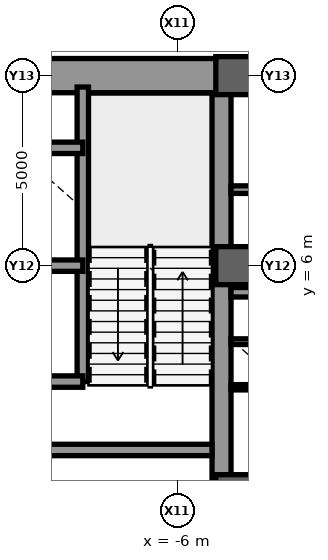
"""IFC4 building model, lengths in metres.
Left out: names, types, materials, properties, quantities, classifications, styles, units other than length and angle.
Written with IfcOpenShell. Run it as: python <this file> out.ifc"""

import sys

from ifc_helpers import new_model, si_unit, direction, frame, frame_2d, origin, origin_2d, place, context, subcontext, project, spatial, rectangle, extrude, source, transform, mapped, element, save


model = new_model("IFC4")
c1 = context("Model", 3, precision=1e-05, world=origin(), true_north=direction((0.0, 1.0)))
c2 = subcontext(c1, "Body", "Model", "MODEL_VIEW")
j1 = project(units=[si_unit("LENGTHUNIT", "METRE"), si_unit("PLANEANGLEUNIT", "RADIAN")], contexts=[c1])
p1 = place(None, origin())
s1 = spatial("IfcSite", under=j1, at=p1, CompositionType="ELEMENT")
p2 = place(p1, origin())
s2 = spatial("IfcBuilding", under=s1, at=p2, CompositionType="ELEMENT")
p3 = place(p2, frame((0.0, 0.0, -9.6)))
s3 = spatial("IfcBuildingStorey", under=s2, at=p3, CompositionType="ELEMENT", Elevation=-9.6)
m1 = source(origin(), c2, "Body", "SweptSolid", [
    extrude(rectangle(XDim=21.4, YDim=0.5, at=frame_2d((10.7, 0.0))), origin(), (0.0, 0.0, 1.0), 4.48),
])
p4 = place(p3, frame((-4.85, -10.7, 0.0), z_axis=(0.0, 0.0, 1.0), x_axis=(0.0, 1.0, 0.0)))
e1 = element("IfcWall", 1, at=p4, inside=s3, PredefinedType="SHEAR", context=c2, shape_type="MappedRepresentation", body=[
    mapped(m1, transform((0.0, 0.0, 0.0), scale=1.0)),
])
m2 = source(origin(), c2, "Body", "SweptSolid", [
    extrude(rectangle(XDim=5.85, YDim=0.9, at=frame_2d((2.925, 0.0))), origin(), (0.0, 0.0, 1.0), 4.48),
])
p5 = place(p3, frame((-10.7, 11.0, 0.0), z_axis=(0.0, 0.0, 1.0), x_axis=(1.0, 0.0, 0.0)))
e2 = element("IfcWall", 2, at=p5, inside=s3, PredefinedType="SHEAR", context=c2, shape_type="MappedRepresentation", body=[
    mapped(m2, transform((0.0, 0.0, 0.0), scale=1.0)),
])
m3 = source(origin(), c2, "Body", "SweptSolid", [
    extrude(rectangle(XDim=5.6, YDim=0.3, at=frame_2d((2.8, 0.0))), origin(), (0.0, 0.0, 1.0), 4.48),
])
p6 = place(p3, frame((-10.7, 1.15, 0.0), z_axis=(0.0, 0.0, 1.0), x_axis=(1.0, 0.0, 0.0)))
e3 = element("IfcWall", 3, at=p6, inside=s3, PredefinedType="SHEAR", context=c2, shape_type="MappedRepresentation", body=[
    mapped(m3, transform((0.0, 0.0, 0.0), scale=1.0)),
])
m4 = source(origin(), c2, "Body", "SweptSolid", [
    extrude(rectangle(XDim=9.2, YDim=0.5, at=frame_2d((4.6, 0.0))), origin(), (0.0, 0.0, 1.0), 4.48),
])
p7 = place(p3, frame((-4.6, 11.0, 0.0), z_axis=(0.0, 0.0, 1.0), x_axis=(1.0, 0.0, 0.0)))
e4 = element("IfcWall", 4, at=p7, inside=s3, PredefinedType="SHEAR", context=c2, shape_type="MappedRepresentation", body=[
    mapped(m4, transform((0.0, 0.0, 0.0), scale=1.0)),
])
m5 = source(origin(), c2, "Body", "SweptSolid", [
    extrude(rectangle(XDim=1.8, YDim=2.25, at=frame_2d((0.9, 1.125))), frame((0.0, 0.26, 0.0), z_axis=(0.0, -1.0, 0.0), x_axis=(1.0, 0.0, 0.0)), (0.0, 0.0, 1.0), 0.52),
])
p8 = place(p7, frame((3.7, 0.0, 0.0)))
e5 = element("IfcOpeningElement", 5, at=p8, cuts=e4, PredefinedType="OPENING", context=c2, shape_type="MappedRepresentation", body=[
    mapped(m5, transform((0.0, 0.0, 0.0), scale=1.0)),
])
m6 = source(origin(), c2, "Body", "SweptSolid", [
    extrude(rectangle(XDim=1.0, YDim=1.0, at=origin_2d()), origin(), (0.0, 0.0, 1.0), 4.8),
])
for number, where, z_axis, x_axis in (
    (6, (-4.5, 0.0, 0.0), (0.0, 0.0, 1.0), (1.0, 0.0, 0.0)),
    (7, (-4.5, 6.0, 0.0), (0.0, 0.0, 1.0), (1.0, 0.0, 0.0)),
    (8, (-4.5, 11.0, 0.0), (0.0, 0.0, 1.0), (1.0, 0.0, 0.0)),
):
    element("IfcColumn", number, at=place(p3, frame(where, z_axis=z_axis, x_axis=x_axis)), inside=s3, PredefinedType="COLUMN", context=c2, shape_type="MappedRepresentation", body=[
        mapped(m6, transform((0.0, 0.0, 0.0), scale=1.0)),
    ])
m7 = source(origin(), c2, "Body", "SweptSolid", [
    extrude(rectangle(XDim=7.75, YDim=0.3, at=frame_2d((3.875, 0.0))), origin(), (0.0, 0.0, 1.0), 4.48),
])
p9 = place(p3, frame((-8.5, 2.95, 0.0), z_axis=(0.0, 0.0, 1.0), x_axis=(0.0, 1.0, 0.0)))
e9 = element("IfcWall", 9, at=p9, inside=s3, PredefinedType="SHEAR", context=c2, shape_type="MappedRepresentation", body=[
    mapped(m7, transform((0.0, 0.0, 0.0), scale=1.0)),
])
m8 = source(origin(), c2, "Body", "SweptSolid", [
    extrude(rectangle(XDim=2.2, YDim=0.3, at=frame_2d((1.1, 0.0))), origin(), (0.0, 0.0, 1.0), 4.48),
])
for number, where, z_axis, x_axis in (
    (10, (-10.7, 2.95, 0.0), (0.0, 0.0, 1.0), (1.0, 0.0, 0.0)),
    (11, (-10.7, 6.0, 0.0), (0.0, 0.0, 1.0), (1.0, 0.0, 0.0)),
    (12, (-10.7, 9.1, 0.0), (0.0, 0.0, 1.0), (1.0, 0.0, 0.0)),
):
    element("IfcWall", number, at=place(p3, frame(where, z_axis=z_axis, x_axis=x_axis)), inside=s3, PredefinedType="SHEAR", context=c2, shape_type="MappedRepresentation", body=[
        mapped(m8, transform((0.0, 0.0, 0.0), scale=1.0)),
    ])
m9 = source(origin(), c2, "Body", "SweptSolid", [
    extrude(rectangle(XDim=3.45, YDim=0.15, at=frame_2d((1.725, 0.0))), origin(), (0.0, 0.0, 1.0), 4.48),
])
p10 = place(p3, frame((-4.6, 4.0, 0.0), z_axis=(0.0, 0.0, 1.0), x_axis=(1.0, 0.0, 0.0)))
e13 = element("IfcWall", 13, at=p10, inside=s3, PredefinedType="PARTITIONING", context=c2, shape_type="MappedRepresentation", body=[
    mapped(m9, transform((0.0, 0.0, 0.0), scale=1.0)),
])
m10 = source(origin(), c2, "Body", "SweptSolid", [
    extrude(rectangle(XDim=2.45, YDim=0.2, at=frame_2d((1.225, 0.0))), origin(), (0.0, 0.0, 1.0), 4.48),
])
p11 = place(p3, frame((-4.6, 8.0, 0.0), z_axis=(0.0, 0.0, 1.0), x_axis=(1.0, 0.0, 0.0)))
e14 = element("IfcWall", 14, at=p11, inside=s3, PredefinedType="SHEAR", context=c2, shape_type="MappedRepresentation", body=[
    mapped(m10, transform((0.0, 0.0, 0.0), scale=1.0)),
])
m11 = source(origin(), c2, "Body", "SweptSolid", [
    extrude(rectangle(XDim=9.2, YDim=0.25, at=frame_2d((4.6, 0.0))), origin(), (0.0, 0.0, 1.0), 4.48),
])
p12 = place(p3, frame((-4.6, 5.3, 0.0), z_axis=(0.0, 0.0, 1.0), x_axis=(1.0, 0.0, 0.0)))
e15 = element("IfcWall", 15, at=p12, inside=s3, PredefinedType="SHEAR", context=c2, shape_type="MappedRepresentation", body=[
    mapped(m11, transform((0.0, 0.0, 0.0), scale=1.0)),
])
m12 = source(origin(), c2, "Body", "SweptSolid", [
    extrude(rectangle(XDim=1.05, YDim=2.2, at=frame_2d((0.525, 1.1))), frame((0.0, 0.135, 0.0), z_axis=(0.0, -1.0, 0.0), x_axis=(1.0, 0.0, 0.0)), (0.0, 0.0, 1.0), 0.27),
])
p13 = place(p12, frame((4.075, 0.0, 0.0)))
e16 = element("IfcOpeningElement", 16, at=p13, cuts=e15, PredefinedType="OPENING", context=c2, shape_type="MappedRepresentation", body=[
    mapped(m12, transform((0.0, 0.0, 0.0), scale=1.0)),
])
m13 = source(origin(), c2, "Body", "SweptSolid", [
    extrude(rectangle(XDim=3.45, YDim=0.14, at=frame_2d((1.725, 0.0))), origin(), (0.0, 0.0, 1.0), 4.48),
])
p14 = place(p3, frame((-4.6, 2.8, 0.0), z_axis=(0.0, 0.0, 1.0), x_axis=(1.0, 0.0, 0.0)))
e17 = element("IfcWall", 17, at=p14, inside=s3, PredefinedType="PARTITIONING", context=c2, shape_type="MappedRepresentation", body=[
    mapped(m13, transform((0.0, 0.0, 0.0), scale=1.0)),
])
save(model, sys.argv[1])
